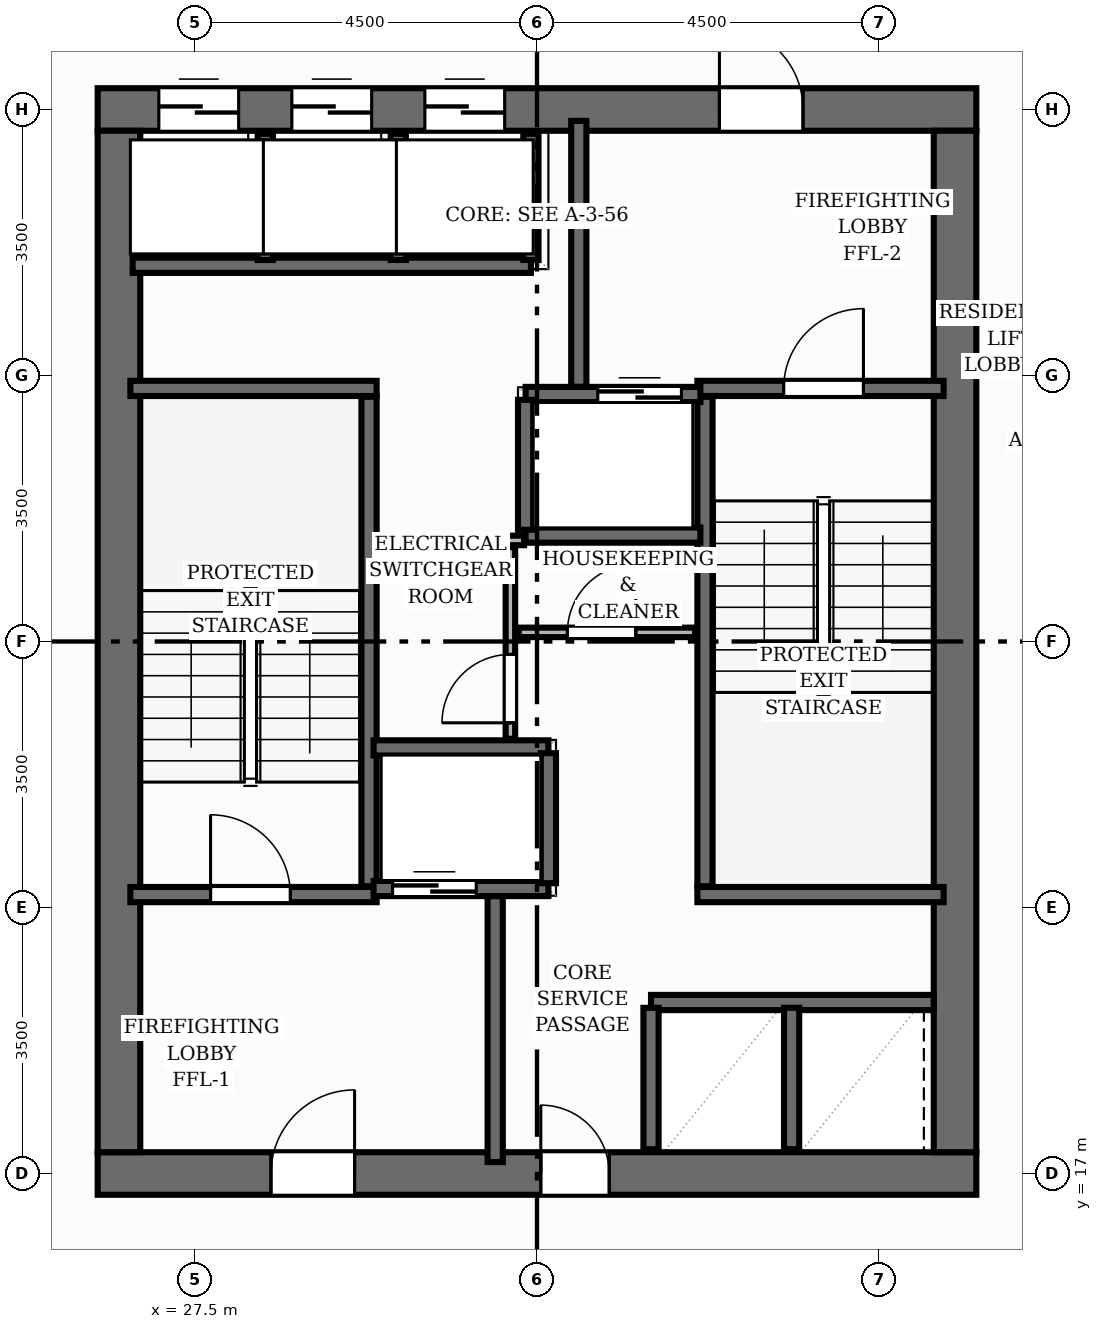
"""IFC4 building model, lengths in metres.
Left out: names, types, materials, properties, quantities, classifications, styles, units other than length and angle.
Written with IfcOpenShell. Run it as: python <this file> out.ifc"""

import sys

from ifc_helpers import new_model, si_unit, direction, frame, frame_2d, origin, place, context, subcontext, project, spatial, rectangle, extrude, element, fill, save


model = new_model("IFC4")
c1 = context("Model", 3, precision=1e-05, world=origin(), true_north=direction((0.0, 1.0)))
c2 = subcontext(c1, "Body", "Model", "MODEL_VIEW")
j1 = project(units=[si_unit("LENGTHUNIT", "METRE"), si_unit("PLANEANGLEUNIT", "RADIAN")], contexts=[c1])
p1 = place(None, origin())
s1 = spatial("IfcSite", under=j1, at=p1, CompositionType="ELEMENT")
p2 = place(p1, origin())
s2 = spatial("IfcBuilding", under=s1, at=p2, CompositionType="ELEMENT")
p3 = place(p2, frame((0.0, 0.0, 233.44)))
s3 = spatial("IfcBuildingStorey", under=s2, at=p3, CompositionType="ELEMENT", Elevation=233.44)
p4 = place(p3, frame((26.22, 17.0, 0.0), z_axis=(0.0, 0.0, 1.0), x_axis=(1.0, 0.0, 0.0)))
e1 = element("IfcWall", 1, at=p4, inside=s3, PredefinedType="SHEAR", context=c2, shape_type="SweptSolid", body=[
    extrude(rectangle(XDim=11.56, YDim=0.56, at=frame_2d((5.78, 0.0))), origin(), (0.0, 0.0, 1.0), 3.2),
])
p5 = place(p4, frame((2.28, 0.0, 0.0)))
e2 = element("IfcOpeningElement", 2, at=p5, cuts=e1, PredefinedType="OPENING", context=c2, shape_type="SweptSolid", body=[
    extrude(rectangle(XDim=1.1, YDim=2.15, at=frame_2d((0.55, 1.075))), frame((0.0, 0.29, 0.0), z_axis=(0.0, -1.0, 0.0), x_axis=(1.0, 0.0, 0.0)), (0.0, 0.0, 1.0), 0.58),
])
p6 = place(p4, frame((5.83, 0.0, 0.0)))
e3 = element("IfcOpeningElement", 3, at=p6, cuts=e1, PredefinedType="OPENING", context=c2, shape_type="SweptSolid", body=[
    extrude(rectangle(XDim=0.9, YDim=2.1, at=frame_2d((0.45, 1.05))), frame((0.0, 0.29, 0.0), z_axis=(0.0, -1.0, 0.0), x_axis=(1.0, 0.0, 0.0)), (0.0, 0.0, 1.0), 0.58),
])
p7 = place(p3, frame((26.22, 31.0, 0.0), z_axis=(0.0, 0.0, 1.0), x_axis=(1.0, 0.0, 0.0)))
e4 = element("IfcWall", 4, at=p7, inside=s3, PredefinedType="SHEAR", context=c2, shape_type="SweptSolid", body=[
    extrude(rectangle(XDim=11.56, YDim=0.56, at=frame_2d((5.78, 0.0))), origin(), (0.0, 0.0, 1.0), 3.2),
])
p8 = place(p7, frame((8.18, 0.0, 0.0)))
e5 = element("IfcOpeningElement", 5, at=p8, cuts=e4, PredefinedType="OPENING", context=c2, shape_type="SweptSolid", body=[
    extrude(rectangle(XDim=1.1, YDim=2.15, at=frame_2d((0.55, 1.075))), frame((0.0, 0.29, 0.0), z_axis=(0.0, -1.0, 0.0), x_axis=(1.0, 0.0, 0.0)), (0.0, 0.0, 1.0), 0.58),
])
p9 = place(p7, frame((0.805, 0.0, 0.0)))
e6 = element("IfcOpeningElement", 6, at=p9, cuts=e4, PredefinedType="OPENING", context=c2, shape_type="SweptSolid", body=[
    extrude(rectangle(XDim=1.05, YDim=2.15, at=frame_2d((0.525, 1.075))), frame((0.0, 0.29, 0.0), z_axis=(0.0, -1.0, 0.0), x_axis=(1.0, 0.0, 0.0)), (0.0, 0.0, 1.0), 0.58),
])
p10 = place(p7, frame((2.555, 0.0, 0.0)))
e7 = element("IfcOpeningElement", 7, at=p10, cuts=e4, PredefinedType="OPENING", context=c2, shape_type="SweptSolid", body=[
    extrude(rectangle(XDim=1.05, YDim=2.15, at=frame_2d((0.525, 1.075))), frame((0.0, 0.29, 0.0), z_axis=(0.0, -1.0, 0.0), x_axis=(1.0, 0.0, 0.0)), (0.0, 0.0, 1.0), 0.58),
])
p11 = place(p7, frame((4.305, 0.0, 0.0)))
e8 = element("IfcOpeningElement", 8, at=p11, cuts=e4, PredefinedType="OPENING", context=c2, shape_type="SweptSolid", body=[
    extrude(rectangle(XDim=1.05, YDim=2.15, at=frame_2d((0.525, 1.075))), frame((0.0, 0.29, 0.0), z_axis=(0.0, -1.0, 0.0), x_axis=(1.0, 0.0, 0.0)), (0.0, 0.0, 1.0), 0.58),
])
for number, where, z_axis, x_axis in (
    (9, (26.5, 17.28, 0.0), (0.0, 0.0, 1.0), (0.0, 1.0, 0.0)),
    (10, (37.5, 17.28, 0.0), (0.0, 0.0, 1.0), (0.0, 1.0, 0.0)),
):
    element("IfcWall", number, at=place(p3, frame(where, z_axis=z_axis, x_axis=x_axis)), inside=s3, PredefinedType="SHEAR", context=c2, shape_type="SweptSolid", body=[
        extrude(rectangle(XDim=13.44, YDim=0.56, at=frame_2d((6.72, 0.0))), origin(), (0.0, 0.0, 1.0), 3.2),
    ])
p12 = place(p3, frame((29.79, 20.78, 0.0), z_axis=(0.0, 0.0, 1.0), x_axis=(0.0, 1.0, 0.0)))
e11 = element("IfcWall", 11, at=p12, inside=s3, PredefinedType="SHEAR", context=c2, shape_type="SweptSolid", body=[
    extrude(rectangle(XDim=6.44, YDim=0.2, at=frame_2d((3.22, 0.0))), origin(), (0.0, 0.0, 1.0), 3.2),
])
p13 = place(p3, frame((26.65, 27.33, 0.0), z_axis=(0.0, 0.0, 1.0), x_axis=(1.0, 0.0, 0.0)))
e12 = element("IfcWall", 12, at=p13, inside=s3, PredefinedType="SHEAR", context=c2, shape_type="SweptSolid", body=[
    extrude(rectangle(XDim=3.24, YDim=0.2, at=frame_2d((1.62, 0.0))), origin(), (0.0, 0.0, 1.0), 3.2),
])
p14 = place(p3, frame((26.65, 20.67, 0.0), z_axis=(0.0, 0.0, 1.0), x_axis=(1.0, 0.0, 0.0)))
e13 = element("IfcWall", 13, at=p14, inside=s3, PredefinedType="SHEAR", context=c2, shape_type="SweptSolid", body=[
    extrude(rectangle(XDim=3.24, YDim=0.2, at=frame_2d((1.62, 0.0))), origin(), (0.0, 0.0, 1.0), 3.2),
])
p15 = place(p14, frame((1.055, 0.0, 0.0)))
e14 = element("IfcOpeningElement", 14, at=p15, cuts=e13, PredefinedType="OPENING", context=c2, shape_type="SweptSolid", body=[
    extrude(rectangle(XDim=1.05, YDim=2.15, at=frame_2d((0.525, 1.075))), frame((0.0, 0.11, 0.0), z_axis=(0.0, -1.0, 0.0), x_axis=(1.0, 0.0, 0.0)), (0.0, 0.0, 1.0), 0.22),
])
p16 = place(p3, frame((34.21, 20.78, 0.0), z_axis=(0.0, 0.0, 1.0), x_axis=(0.0, 1.0, 0.0)))
e15 = element("IfcWall", 15, at=p16, inside=s3, PredefinedType="SHEAR", context=c2, shape_type="SweptSolid", body=[
    extrude(rectangle(XDim=6.44, YDim=0.2, at=frame_2d((3.22, 0.0))), origin(), (0.0, 0.0, 1.0), 3.2),
])
p17 = place(p3, frame((34.11, 20.67, 0.0), z_axis=(0.0, 0.0, 1.0), x_axis=(1.0, 0.0, 0.0)))
e16 = element("IfcWall", 16, at=p17, inside=s3, PredefinedType="SHEAR", context=c2, shape_type="SweptSolid", body=[
    extrude(rectangle(XDim=3.24, YDim=0.2, at=frame_2d((1.62, 0.0))), origin(), (0.0, 0.0, 1.0), 3.2),
])
p18 = place(p3, frame((34.11, 27.33, 0.0), z_axis=(0.0, 0.0, 1.0), x_axis=(1.0, 0.0, 0.0)))
e17 = element("IfcWall", 17, at=p18, inside=s3, PredefinedType="SHEAR", context=c2, shape_type="SweptSolid", body=[
    extrude(rectangle(XDim=3.24, YDim=0.2, at=frame_2d((1.62, 0.0))), origin(), (0.0, 0.0, 1.0), 3.2),
])
p19 = place(p18, frame((1.135, 0.0, 0.0)))
e18 = element("IfcOpeningElement", 18, at=p19, cuts=e17, PredefinedType="OPENING", context=c2, shape_type="SweptSolid", body=[
    extrude(rectangle(XDim=1.05, YDim=2.15, at=frame_2d((0.525, 1.075))), frame((0.0, 0.11, 0.0), z_axis=(0.0, -1.0, 0.0), x_axis=(1.0, 0.0, 0.0)), (0.0, 0.0, 1.0), 0.22),
])
for number, where, z_axis, x_axis in (
    (19, (31.45, 17.15, 0.0), (0.0, 0.0, 1.0), (0.0, 1.0, 0.0)),
    (20, (32.55, 27.35, 0.0), (0.0, 0.0, 1.0), (0.0, 1.0, 0.0)),
):
    element("IfcWall", number, at=place(p3, frame(where, z_axis=z_axis, x_axis=x_axis)), inside=s3, PredefinedType="SHEAR", context=c2, shape_type="SweptSolid", body=[
        extrude(rectangle(XDim=3.5, YDim=0.2, at=frame_2d((1.75, 0.0))), origin(), (0.0, 0.0, 1.0), 3.2),
    ])
p20 = place(p3, frame((29.85, 20.75, 0.0), z_axis=(0.0, 0.0, 1.0), x_axis=(1.0, 0.0, 0.0)))
e21 = element("IfcWall", 21, at=p20, inside=s3, PredefinedType="SHEAR", context=c2, shape_type="SweptSolid", body=[
    extrude(rectangle(XDim=2.3, YDim=0.2, at=frame_2d((1.15, 0.0))), origin(), (0.0, 0.0, 1.0), 3.2),
])
p21 = place(p20, frame((0.25, 0.0, 0.0)))
e22 = element("IfcOpeningElement", 22, at=p21, cuts=e21, PredefinedType="OPENING", context=c2, shape_type="SweptSolid", body=[
    extrude(rectangle(XDim=1.1, YDim=2.15, at=frame_2d((0.55, 1.075))), frame((0.0, 0.11, 0.0), z_axis=(0.0, -1.0, 0.0), x_axis=(1.0, 0.0, 0.0)), (0.0, 0.0, 1.0), 0.22),
])
p22 = place(p3, frame((29.85, 22.6, 0.0), z_axis=(0.0, 0.0, 1.0), x_axis=(1.0, 0.0, 0.0)))
e23 = element("IfcWall", 23, at=p22, inside=s3, PredefinedType="SHEAR", context=c2, shape_type="SweptSolid", body=[
    extrude(rectangle(XDim=2.3, YDim=0.2, at=frame_2d((1.15, 0.0))), origin(), (0.0, 0.0, 1.0), 3.2),
])
p23 = place(p3, frame((32.15, 20.82, 0.0), z_axis=(0.0, 0.0, 1.0), x_axis=(0.0, 1.0, 0.0)))
e24 = element("IfcWall", 24, at=p23, inside=s3, PredefinedType="SHEAR", context=c2, shape_type="SweptSolid", body=[
    extrude(rectangle(XDim=1.71, YDim=0.2, at=frame_2d((0.855, 0.0))), origin(), (0.0, 0.0, 1.0), 3.2),
])
p24 = place(p3, frame((31.85, 27.25, 0.0), z_axis=(0.0, 0.0, 1.0), x_axis=(1.0, 0.0, 0.0)))
e25 = element("IfcWall", 25, at=p24, inside=s3, PredefinedType="SHEAR", context=c2, shape_type="SweptSolid", body=[
    extrude(rectangle(XDim=2.3, YDim=0.2, at=frame_2d((1.15, 0.0))), origin(), (0.0, 0.0, 1.0), 3.2),
])
p25 = place(p24, frame((0.95, 0.0, 0.0)))
e26 = element("IfcOpeningElement", 26, at=p25, cuts=e25, PredefinedType="OPENING", context=c2, shape_type="SweptSolid", body=[
    extrude(rectangle(XDim=1.1, YDim=2.15, at=frame_2d((0.55, 1.075))), frame((0.0, 0.11, 0.0), z_axis=(0.0, -1.0, 0.0), x_axis=(1.0, 0.0, 0.0)), (0.0, 0.0, 1.0), 0.22),
])
p26 = place(p3, frame((31.85, 25.4, 0.0), z_axis=(0.0, 0.0, 1.0), x_axis=(1.0, 0.0, 0.0)))
e27 = element("IfcWall", 27, at=p26, inside=s3, PredefinedType="SHEAR", context=c2, shape_type="SweptSolid", body=[
    extrude(rectangle(XDim=2.3, YDim=0.2, at=frame_2d((1.15, 0.0))), origin(), (0.0, 0.0, 1.0), 3.2),
])
p27 = place(p3, frame((31.85, 25.47, 0.0), z_axis=(0.0, 0.0, 1.0), x_axis=(0.0, 1.0, 0.0)))
e28 = element("IfcWall", 28, at=p27, inside=s3, PredefinedType="SHEAR", context=c2, shape_type="SweptSolid", body=[
    extrude(rectangle(XDim=1.71, YDim=0.2, at=frame_2d((0.855, 0.0))), origin(), (0.0, 0.0, 1.0), 3.2),
])
p28 = place(p3, frame((26.68, 28.95, 0.0), z_axis=(0.0, 0.0, 1.0), x_axis=(1.0, 0.0, 0.0)))
e29 = element("IfcWall", 29, at=p28, inside=s3, PredefinedType="SHEAR", context=c2, shape_type="SweptSolid", body=[
    extrude(rectangle(XDim=5.24, YDim=0.2, at=frame_2d((2.62, 0.0))), origin(), (0.0, 0.0, 1.0), 3.2),
])
for number, where, z_axis, x_axis in (
    (30, (31.92, 29.02, 0.0), (0.0, 0.0, 1.0), (0.0, 1.0, 0.0)),
    (31, (28.425, 29.02, 0.0), (0.0, 0.0, 1.0), (0.0, 1.0, 0.0)),
    (32, (30.175, 29.02, 0.0), (0.0, 0.0, 1.0), (0.0, 1.0, 0.0)),
):
    element("IfcWall", number, at=place(p3, frame(where, z_axis=z_axis, x_axis=x_axis)), inside=s3, PredefinedType="SHEAR", context=c2, shape_type="SweptSolid", body=[
        extrude(rectangle(XDim=1.66, YDim=0.2, at=frame_2d((0.83, 0.0))), origin(), (0.0, 0.0, 1.0), 3.2),
    ])
p29 = place(p3, frame((33.5, 19.25, 0.0), z_axis=(0.0, 0.0, 1.0), x_axis=(1.0, 0.0, 0.0)))
e33 = element("IfcWall", 33, at=p29, inside=s3, PredefinedType="SHEAR", context=c2, shape_type="SweptSolid", body=[
    extrude(rectangle(XDim=3.72, YDim=0.2, at=frame_2d((1.86, 0.0))), origin(), (0.0, 0.0, 1.0), 3.2),
])
for number, where, z_axis, x_axis in (
    (34, (33.5, 17.32, 0.0), (0.0, 0.0, 1.0), (0.0, 1.0, 0.0)),
    (35, (35.35, 17.32, 0.0), (0.0, 0.0, 1.0), (0.0, 1.0, 0.0)),
):
    element("IfcWall", number, at=place(p3, frame(where, z_axis=z_axis, x_axis=x_axis)), inside=s3, PredefinedType="SHEAR", context=c2, shape_type="SweptSolid", body=[
        extrude(rectangle(XDim=1.86, YDim=0.2, at=frame_2d((0.93, 0.0))), origin(), (0.0, 0.0, 1.0), 3.2),
    ])
p30 = place(p3, frame((31.65, 22.72, 0.0), z_axis=(0.0, 0.0, 1.0), x_axis=(0.0, 1.0, 0.0)))
e36 = element("IfcWall", 36, at=p30, inside=s3, PredefinedType="PARTITIONING", context=c2, shape_type="SweptSolid", body=[
    extrude(rectangle(XDim=2.52, YDim=0.125, at=frame_2d((1.26, 0.0))), origin(), (0.0, 0.0, 1.0), 2.955),
])
p31 = place(p30, frame((0.21, 0.0, 0.0)))
e37 = element("IfcOpeningElement", 37, at=p31, cuts=e36, PredefinedType="OPENING", context=c2, shape_type="SweptSolid", body=[
    extrude(rectangle(XDim=0.9, YDim=2.1, at=frame_2d((0.45, 1.05))), frame((0.0, 0.073, 0.0), z_axis=(0.0, -1.0, 0.0), x_axis=(1.0, 0.0, 0.0)), (0.0, 0.0, 1.0), 0.145),
])
p32 = place(p3, frame((31.76, 24.12, 0.0), z_axis=(0.0, 0.0, 1.0), x_axis=(1.0, 0.0, 0.0)))
e38 = element("IfcWall", 38, at=p32, inside=s3, PredefinedType="PARTITIONING", context=c2, shape_type="SweptSolid", body=[
    extrude(rectangle(XDim=2.32, YDim=0.125, at=frame_2d((1.16, 0.0))), origin(), (0.0, 0.0, 1.0), 2.955),
])
p33 = place(p32, frame((0.64, 0.0, 0.0)))
e39 = element("IfcOpeningElement", 39, at=p33, cuts=e38, PredefinedType="OPENING", context=c2, shape_type="SweptSolid", body=[
    extrude(rectangle(XDim=0.9, YDim=2.1, at=frame_2d((0.45, 1.05))), frame((0.0, 0.073, 0.0), z_axis=(0.0, -1.0, 0.0), x_axis=(1.0, 0.0, 0.0)), (0.0, 0.0, 1.0), 0.145),
])
p34 = place(p3, frame((29.89, 25.33, 0.0), z_axis=(0.0, 0.0, 1.0), x_axis=(1.0, 0.0, 0.0)))
e40 = element("IfcWall", 40, at=p34, inside=s3, PredefinedType="PARTITIONING", context=c2, shape_type="SweptSolid", body=[
    extrude(rectangle(XDim=1.94, YDim=0.125, at=frame_2d((0.97, 0.0))), origin(), (0.0, 0.0, 1.0), 2.955),
])
p35 = place(p15, origin())
e41 = element("IfcDoor", 41, at=p35, inside=s3, OperationType="SINGLE_SWING_LEFT", PredefinedType="DOOR", context=c2, shape_type="SweptSolid", body=[
    extrude(rectangle(XDim=1.05, YDim=2.15, at=frame_2d((0.525, 1.075))), frame((0.0, 0.025, 0.0), z_axis=(0.0, -1.0, 0.0), x_axis=(1.0, 0.0, 0.0)), (0.0, 0.0, 1.0), 0.05),
])
fill(e14, e41)
p36 = place(p19, origin())
e42 = element("IfcDoor", 42, at=p36, inside=s3, OperationType="SINGLE_SWING_RIGHT", PredefinedType="DOOR", context=c2, shape_type="SweptSolid", body=[
    extrude(rectangle(XDim=1.05, YDim=2.15, at=frame_2d((0.525, 1.075))), frame((0.0, 0.025, 0.0), z_axis=(0.0, -1.0, 0.0), x_axis=(1.0, 0.0, 0.0)), (0.0, 0.0, 1.0), 0.05),
])
fill(e18, e42)
p37 = place(p5, origin())
e43 = element("IfcDoor", 43, at=p37, inside=s3, OperationType="SINGLE_SWING_RIGHT", PredefinedType="DOOR", context=c2, shape_type="SweptSolid", body=[
    extrude(rectangle(XDim=1.1, YDim=2.15, at=frame_2d((0.55, 1.075))), frame((0.0, 0.025, 0.0), z_axis=(0.0, -1.0, 0.0), x_axis=(1.0, 0.0, 0.0)), (0.0, 0.0, 1.0), 0.05),
])
fill(e2, e43)
p38 = place(p8, origin())
e44 = element("IfcDoor", 44, at=p38, inside=s3, OperationType="SINGLE_SWING_LEFT", PredefinedType="DOOR", context=c2, shape_type="SweptSolid", body=[
    extrude(rectangle(XDim=1.1, YDim=2.15, at=frame_2d((0.55, 1.075))), frame((0.0, 0.025, 0.0), z_axis=(0.0, -1.0, 0.0), x_axis=(1.0, 0.0, 0.0)), (0.0, 0.0, 1.0), 0.05),
])
fill(e5, e44)
p39 = place(p21, origin())
e45 = element("IfcDoor", 45, at=p39, inside=s3, OperationType="DOUBLE_DOOR_SLIDING", PredefinedType="DOOR", context=c2, shape_type="SweptSolid", body=[
    extrude(rectangle(XDim=1.1, YDim=2.15, at=frame_2d((0.55, 1.075))), frame((0.0, 0.025, 0.0), z_axis=(0.0, -1.0, 0.0), x_axis=(1.0, 0.0, 0.0)), (0.0, 0.0, 1.0), 0.05),
])
fill(e22, e45)
p40 = place(p25, origin())
e46 = element("IfcDoor", 46, at=p40, inside=s3, OperationType="DOUBLE_DOOR_SLIDING", PredefinedType="DOOR", context=c2, shape_type="SweptSolid", body=[
    extrude(rectangle(XDim=1.1, YDim=2.15, at=frame_2d((0.55, 1.075))), frame((0.0, 0.025, 0.0), z_axis=(0.0, -1.0, 0.0), x_axis=(1.0, 0.0, 0.0)), (0.0, 0.0, 1.0), 0.05),
])
fill(e26, e46)
p41 = place(p9, origin())
e47 = element("IfcDoor", 47, at=p41, inside=s3, OperationType="DOUBLE_DOOR_SLIDING", PredefinedType="DOOR", context=c2, shape_type="SweptSolid", body=[
    extrude(rectangle(XDim=1.05, YDim=2.15, at=frame_2d((0.525, 1.075))), frame((0.0, 0.025, 0.0), z_axis=(0.0, -1.0, 0.0), x_axis=(1.0, 0.0, 0.0)), (0.0, 0.0, 1.0), 0.05),
])
fill(e6, e47)
p42 = place(p10, origin())
e48 = element("IfcDoor", 48, at=p42, inside=s3, OperationType="DOUBLE_DOOR_SLIDING", PredefinedType="DOOR", context=c2, shape_type="SweptSolid", body=[
    extrude(rectangle(XDim=1.05, YDim=2.15, at=frame_2d((0.525, 1.075))), frame((0.0, 0.025, 0.0), z_axis=(0.0, -1.0, 0.0), x_axis=(1.0, 0.0, 0.0)), (0.0, 0.0, 1.0), 0.05),
])
fill(e7, e48)
p43 = place(p11, origin())
e49 = element("IfcDoor", 49, at=p43, inside=s3, OperationType="DOUBLE_DOOR_SLIDING", PredefinedType="DOOR", context=c2, shape_type="SweptSolid", body=[
    extrude(rectangle(XDim=1.05, YDim=2.15, at=frame_2d((0.525, 1.075))), frame((0.0, 0.025, 0.0), z_axis=(0.0, -1.0, 0.0), x_axis=(1.0, 0.0, 0.0)), (0.0, 0.0, 1.0), 0.05),
])
fill(e8, e49)
p44 = place(p6, origin())
e50 = element("IfcDoor", 50, at=p44, inside=s3, OperationType="SINGLE_SWING_LEFT", PredefinedType="DOOR", context=c2, shape_type="SweptSolid", body=[
    extrude(rectangle(XDim=0.9, YDim=2.1, at=frame_2d((0.45, 1.05))), frame((0.0, 0.025, 0.0), z_axis=(0.0, -1.0, 0.0), x_axis=(1.0, 0.0, 0.0)), (0.0, 0.0, 1.0), 0.05),
])
fill(e3, e50)
p45 = place(p31, origin())
e51 = element("IfcDoor", 51, at=p45, inside=s3, OperationType="SINGLE_SWING_LEFT", PredefinedType="DOOR", context=c2, shape_type="SweptSolid", body=[
    extrude(rectangle(XDim=0.9, YDim=2.1, at=frame_2d((0.45, 1.05))), frame((0.0, 0.025, 0.0), z_axis=(0.0, -1.0, 0.0), x_axis=(1.0, 0.0, 0.0)), (0.0, 0.0, 1.0), 0.05),
])
fill(e37, e51)
p46 = place(p33, origin())
e52 = element("IfcDoor", 52, at=p46, inside=s3, OperationType="SINGLE_SWING_RIGHT", PredefinedType="DOOR", context=c2, shape_type="SweptSolid", body=[
    extrude(rectangle(XDim=0.9, YDim=2.1, at=frame_2d((0.45, 1.05))), frame((0.0, 0.025, 0.0), z_axis=(0.0, -1.0, 0.0), x_axis=(1.0, 0.0, 0.0)), (0.0, 0.0, 1.0), 0.05),
])
fill(e39, e52)
save(model, sys.argv[1])
